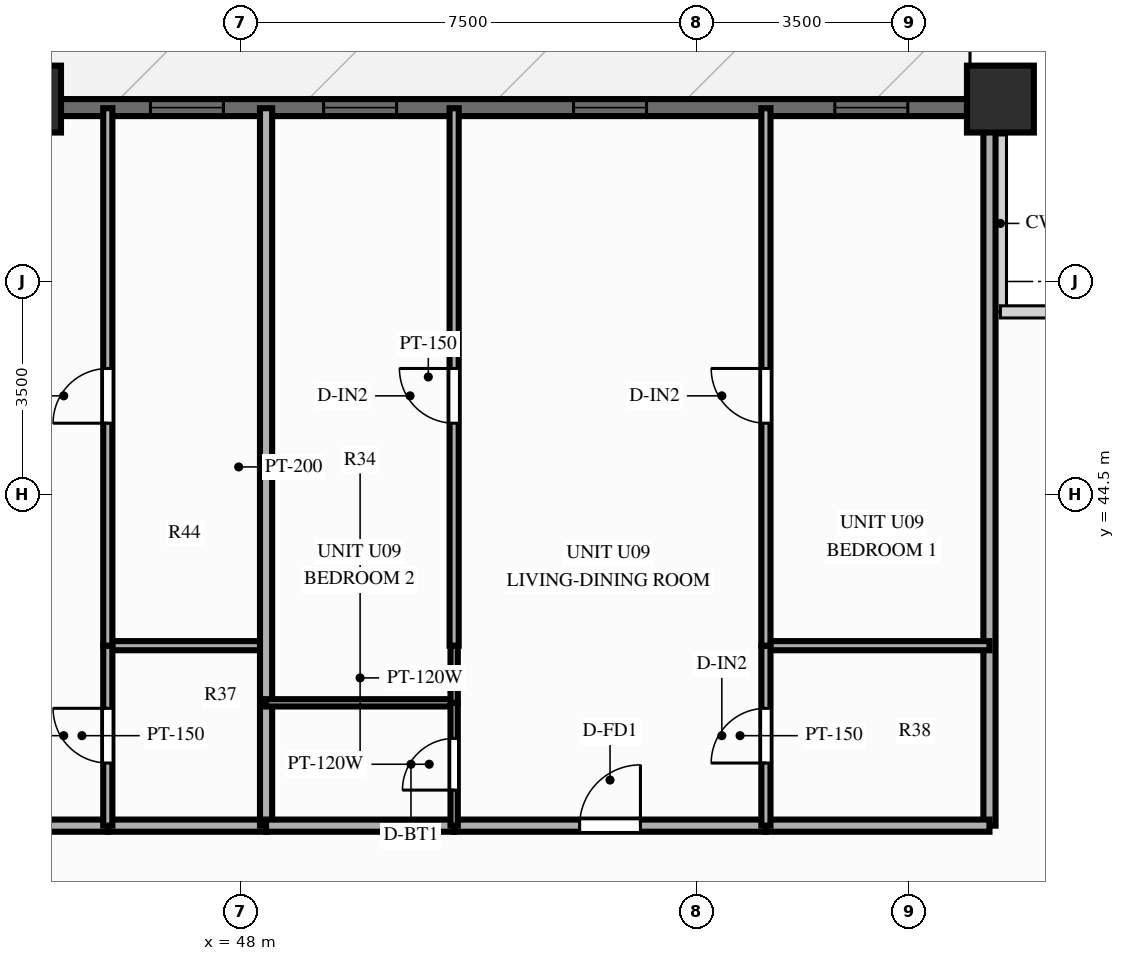
"""IFC4 building model, lengths in metres.
Left out: names, types, materials, properties, quantities, classifications, styles, units other than length and angle.
Written with IfcOpenShell. Run it as: python <this file> out.ifc"""

import sys

from ifc_helpers import new_model, si_unit, direction, frame, frame_2d, origin, origin_2d, place, context, subcontext, project, spatial, rectangle, extrude, source, transform, mapped, element, fill, save


model = new_model("IFC4")
c1 = context("Model", 3, precision=1e-05, world=origin(), true_north=direction((0.0, 1.0)))
c2 = subcontext(c1, "Body", "Model", "MODEL_VIEW")
j1 = project(units=[si_unit("LENGTHUNIT", "METRE"), si_unit("PLANEANGLEUNIT", "RADIAN")], contexts=[c1])
p1 = place(None, origin())
s1 = spatial("IfcSite", under=j1, at=p1, CompositionType="ELEMENT")
p2 = place(p1, origin())
s2 = spatial("IfcBuilding", under=s1, at=p2, CompositionType="ELEMENT")
p3 = place(p2, frame((0.0, 0.0, 61.4)))
s3 = spatial("IfcBuildingStorey", under=s2, at=p3, CompositionType="ELEMENT", Elevation=61.4)
m1 = source(origin(), c2, "Body", "SweptSolid", [
    extrude(rectangle(XDim=1.1, YDim=1.1, at=origin_2d()), origin(), (0.0, 0.0, 1.0), 3.0),
])
for number, where, z_axis, x_axis in (
    (1, (60.5, 51.0, 0.0), (0.0, 0.0, 1.0), (1.0, 0.0, 0.0)),
    (2, (44.5, 51.0, 0.0), (0.0, 0.0, 1.0), (1.0, 0.0, 0.0)),
):
    element("IfcColumn", number, at=place(p3, frame(where, z_axis=z_axis, x_axis=x_axis)), inside=s3, PredefinedType="COLUMN", context=c2, shape_type="MappedRepresentation", body=[
        mapped(m1, transform((0.0, 0.0, 0.0), scale=1.0)),
    ])
p4 = place(p3, frame((15.5, 50.86, 0.0), z_axis=(0.0, 0.0, 1.0), x_axis=(1.0, 0.0, 0.0)))
e3 = element("IfcWall", 3, at=p4, inside=s3, PredefinedType="SOLIDWALL", context=c2, shape_type="SweptSolid", body=[
    extrude(rectangle(XDim=45.0, YDim=0.28, at=frame_2d((22.5, 0.0))), origin(), (0.0, 0.0, 1.0), 2.28),
])
p5 = place(p4, frame((0.76, 0.0, 0.25)))
e4 = element("IfcOpeningElement", 4, at=p5, cuts=e3, PredefinedType="OPENING", context=c2, shape_type="SweptSolid", body=[
    extrude(rectangle(XDim=1.2, YDim=1.5, at=frame_2d((0.6, 0.75))), frame((0.0, 0.152, 0.0), z_axis=(0.0, -1.0, 0.0), x_axis=(1.0, 0.0, 0.0)), (0.0, 0.0, 1.0), 0.304),
])
p6 = place(p4, frame((2.92, 0.0, 0.25)))
e5 = element("IfcOpeningElement", 5, at=p6, cuts=e3, PredefinedType="OPENING", context=c2, shape_type="SweptSolid", body=[
    extrude(rectangle(XDim=1.2, YDim=1.5, at=frame_2d((0.6, 0.75))), frame((0.0, 0.152, 0.0), z_axis=(0.0, -1.0, 0.0), x_axis=(1.0, 0.0, 0.0)), (0.0, 0.0, 1.0), 0.304),
])
p7 = place(p4, frame((5.554, 0.0, 0.25)))
e6 = element("IfcOpeningElement", 6, at=p7, cuts=e3, PredefinedType="OPENING", context=c2, shape_type="SweptSolid", body=[
    extrude(rectangle(XDim=1.2, YDim=1.5, at=frame_2d((0.6, 0.75))), frame((0.0, 0.152, 0.0), z_axis=(0.0, -1.0, 0.0), x_axis=(1.0, 0.0, 0.0)), (0.0, 0.0, 1.0), 0.304),
])
p8 = place(p4, frame((8.613, 0.0, 0.25)))
e7 = element("IfcOpeningElement", 7, at=p8, cuts=e3, PredefinedType="OPENING", context=c2, shape_type="SweptSolid", body=[
    extrude(rectangle(XDim=1.2, YDim=1.5, at=frame_2d((0.6, 0.75))), frame((0.0, 0.152, 0.0), z_axis=(0.0, -1.0, 0.0), x_axis=(1.0, 0.0, 0.0)), (0.0, 0.0, 1.0), 0.304),
])
p9 = place(p4, frame((11.418, 0.0, 0.25)))
e8 = element("IfcOpeningElement", 8, at=p9, cuts=e3, PredefinedType="OPENING", context=c2, shape_type="SweptSolid", body=[
    extrude(rectangle(XDim=1.2, YDim=1.5, at=frame_2d((0.6, 0.75))), frame((0.0, 0.152, 0.0), z_axis=(0.0, -1.0, 0.0), x_axis=(1.0, 0.0, 0.0)), (0.0, 0.0, 1.0), 0.304),
])
p10 = place(p4, frame((13.809, 0.0, 0.25)))
e9 = element("IfcOpeningElement", 9, at=p10, cuts=e3, PredefinedType="OPENING", context=c2, shape_type="SweptSolid", body=[
    extrude(rectangle(XDim=1.2, YDim=1.5, at=frame_2d((0.6, 0.75))), frame((0.0, 0.152, 0.0), z_axis=(0.0, -1.0, 0.0), x_axis=(1.0, 0.0, 0.0)), (0.0, 0.0, 1.0), 0.304),
])
p11 = place(p4, frame((17.258, 0.0, 0.25)))
e10 = element("IfcOpeningElement", 10, at=p11, cuts=e3, PredefinedType="OPENING", context=c2, shape_type="SweptSolid", body=[
    extrude(rectangle(XDim=1.2, YDim=1.5, at=frame_2d((0.6, 0.75))), frame((0.0, 0.152, 0.0), z_axis=(0.0, -1.0, 0.0), x_axis=(1.0, 0.0, 0.0)), (0.0, 0.0, 1.0), 0.304),
])
p12 = place(p4, frame((20.101, 0.0, 0.25)))
e11 = element("IfcOpeningElement", 11, at=p12, cuts=e3, PredefinedType="OPENING", context=c2, shape_type="SweptSolid", body=[
    extrude(rectangle(XDim=1.2, YDim=1.5, at=frame_2d((0.6, 0.75))), frame((0.0, 0.152, 0.0), z_axis=(0.0, -1.0, 0.0), x_axis=(1.0, 0.0, 0.0)), (0.0, 0.0, 1.0), 0.304),
])
p13 = place(p4, frame((24.793, 0.0, 0.0)))
e12 = element("IfcOpeningElement", 12, at=p13, cuts=e3, PredefinedType="OPENING", context=c2, shape_type="SweptSolid", body=[
    extrude(rectangle(XDim=1.1, YDim=2.15, at=frame_2d((0.55, 1.075))), frame((0.0, 0.152, 0.0), z_axis=(0.0, -1.0, 0.0), x_axis=(1.0, 0.0, 0.0)), (0.0, 0.0, 1.0), 0.304),
])
p14 = place(p4, frame((31.021, 0.0, 0.25)))
e13 = element("IfcOpeningElement", 13, at=p14, cuts=e3, PredefinedType="OPENING", context=c2, shape_type="SweptSolid", body=[
    extrude(rectangle(XDim=1.2, YDim=1.5, at=frame_2d((0.6, 0.75))), frame((0.0, 0.152, 0.0), z_axis=(0.0, -1.0, 0.0), x_axis=(1.0, 0.0, 0.0)), (0.0, 0.0, 1.0), 0.304),
])
p15 = place(p4, frame((33.869, 0.0, 0.25)))
e14 = element("IfcOpeningElement", 14, at=p15, cuts=e3, PredefinedType="OPENING", context=c2, shape_type="SweptSolid", body=[
    extrude(rectangle(XDim=1.2, YDim=1.5, at=frame_2d((0.6, 0.75))), frame((0.0, 0.152, 0.0), z_axis=(0.0, -1.0, 0.0), x_axis=(1.0, 0.0, 0.0)), (0.0, 0.0, 1.0), 0.304),
])
p16 = place(p4, frame((37.98, 0.0, 0.25)))
e15 = element("IfcOpeningElement", 15, at=p16, cuts=e3, PredefinedType="OPENING", context=c2, shape_type="SweptSolid", body=[
    extrude(rectangle(XDim=1.2, YDim=1.5, at=frame_2d((0.6, 0.75))), frame((0.0, 0.152, 0.0), z_axis=(0.0, -1.0, 0.0), x_axis=(1.0, 0.0, 0.0)), (0.0, 0.0, 1.0), 0.304),
])
p17 = place(p4, frame((42.277, 0.0, 0.25)))
e16 = element("IfcOpeningElement", 16, at=p17, cuts=e3, PredefinedType="OPENING", context=c2, shape_type="SweptSolid", body=[
    extrude(rectangle(XDim=1.2, YDim=1.5, at=frame_2d((0.6, 0.75))), frame((0.0, 0.152, 0.0), z_axis=(0.0, -1.0, 0.0), x_axis=(1.0, 0.0, 0.0)), (0.0, 0.0, 1.0), 0.304),
])
p18 = place(p3, frame((60.32, 39.05, 0.0), z_axis=(0.0, 0.0, 1.0), x_axis=(0.0, 1.0, 0.0)))
e17 = element("IfcWall", 17, at=p18, inside=s3, PredefinedType="PARTITIONING", context=c2, shape_type="SweptSolid", body=[
    extrude(rectangle(XDim=11.8, YDim=0.2, at=frame_2d((5.9, 0.0))), origin(), (0.0, 0.0, 1.0), 2.79),
])
p19 = place(p3, frame((37.576, 39.05, 0.0), z_axis=(0.0, 0.0, 1.0), x_axis=(1.0, 0.0, 0.0)))
e18 = element("IfcWall", 18, at=p19, inside=s3, PredefinedType="PARTITIONING", context=c2, shape_type="SweptSolid", body=[
    extrude(rectangle(XDim=8.244, YDim=0.2, at=frame_2d((4.122, 0.0))), origin(), (0.0, 0.0, 1.0), 2.79),
])
p20 = place(p19, frame((3.622, 0.0, 0.0)))
e19 = element("IfcOpeningElement", 19, at=p20, cuts=e18, PredefinedType="OPENING", context=c2, shape_type="SweptSolid", body=[
    extrude(rectangle(XDim=1.0, YDim=2.15, at=frame_2d((0.5, 1.075))), frame((0.0, 0.112, 0.0), z_axis=(0.0, -1.0, 0.0), x_axis=(1.0, 0.0, 0.0)), (0.0, 0.0, 1.0), 0.224),
])
p21 = place(p3, frame((45.82, 39.05, 0.0), z_axis=(0.0, 0.0, 1.0), x_axis=(1.0, 0.0, 0.0)))
e20 = element("IfcWall", 20, at=p21, inside=s3, PredefinedType="PARTITIONING", context=c2, shape_type="SweptSolid", body=[
    extrude(rectangle(XDim=2.603, YDim=0.2, at=frame_2d((1.301, 0.0))), origin(), (0.0, 0.0, 1.0), 2.79),
])
p22 = place(p3, frame((45.82, 42.01, 0.0), z_axis=(0.0, 0.0, 1.0), x_axis=(1.0, 0.0, 0.0)))
e21 = element("IfcWall", 21, at=p22, inside=s3, PredefinedType="PARTITIONING", context=c2, shape_type="SweptSolid", body=[
    extrude(rectangle(XDim=2.603, YDim=0.15, at=frame_2d((1.301, 0.0))), origin(), (0.0, 0.0, 1.0), 2.79),
])
p23 = place(p3, frame((45.82, 39.05, 0.0), z_axis=(0.0, 0.0, 1.0), x_axis=(0.0, 1.0, 0.0)))
e22 = element("IfcWall", 22, at=p23, inside=s3, PredefinedType="PARTITIONING", context=c2, shape_type="SweptSolid", body=[
    extrude(rectangle(XDim=2.96, YDim=0.15, at=frame_2d((1.48, 0.0))), origin(), (0.0, 0.0, 1.0), 2.79),
])
p24 = place(p23, frame((1.03, 0.0, 0.0)))
e23 = element("IfcOpeningElement", 23, at=p24, cuts=e22, PredefinedType="OPENING", context=c2, shape_type="SweptSolid", body=[
    extrude(rectangle(XDim=0.9, YDim=2.1, at=frame_2d((0.45, 1.05))), frame((0.0, 0.087, 0.0), z_axis=(0.0, -1.0, 0.0), x_axis=(1.0, 0.0, 0.0)), (0.0, 0.0, 1.0), 0.174),
])
p25 = place(p3, frame((45.82, 42.01, 0.0), z_axis=(0.0, 0.0, 1.0), x_axis=(0.0, 1.0, 0.0)))
e24 = element("IfcWall", 24, at=p25, inside=s3, PredefinedType="PARTITIONING", context=c2, shape_type="SweptSolid", body=[
    extrude(rectangle(XDim=8.84, YDim=0.15, at=frame_2d((4.42, 0.0))), origin(), (0.0, 0.0, 1.0), 2.79),
])
p26 = place(p25, frame((3.659, 0.0, 0.0)))
e25 = element("IfcOpeningElement", 25, at=p26, cuts=e24, PredefinedType="OPENING", context=c2, shape_type="SweptSolid", body=[
    extrude(rectangle(XDim=0.9, YDim=2.1, at=frame_2d((0.45, 1.05))), frame((0.0, 0.087, 0.0), z_axis=(0.0, -1.0, 0.0), x_axis=(1.0, 0.0, 0.0)), (0.0, 0.0, 1.0), 0.174),
])
p27 = place(p3, frame((48.423, 39.05, 0.0), z_axis=(0.0, 0.0, 1.0), x_axis=(0.0, 1.0, 0.0)))
e26 = element("IfcWall", 26, at=p27, inside=s3, PredefinedType="PARTITIONING", context=c2, shape_type="SweptSolid", body=[
    extrude(rectangle(XDim=11.8, YDim=0.2, at=frame_2d((5.9, 0.0))), origin(), (0.0, 0.0, 1.0), 2.79),
])
p28 = place(p3, frame((48.423, 39.05, 0.0), z_axis=(0.0, 0.0, 1.0), x_axis=(1.0, 0.0, 0.0)))
e27 = element("IfcWall", 27, at=p28, inside=s3, PredefinedType="PARTITIONING", context=c2, shape_type="SweptSolid", body=[
    extrude(rectangle(XDim=3.093, YDim=0.2, at=frame_2d((1.547, 0.0))), origin(), (0.0, 0.0, 1.0), 2.79),
])
p29 = place(p3, frame((51.516, 39.05, 0.0), z_axis=(0.0, 0.0, 1.0), x_axis=(1.0, 0.0, 0.0)))
e28 = element("IfcWall", 28, at=p29, inside=s3, PredefinedType="PARTITIONING", context=c2, shape_type="SweptSolid", body=[
    extrude(rectangle(XDim=5.127, YDim=0.2, at=frame_2d((2.564, 0.0))), origin(), (0.0, 0.0, 1.0), 2.79),
])
p30 = place(p29, frame((2.064, 0.0, 0.0)))
e29 = element("IfcOpeningElement", 29, at=p30, cuts=e28, PredefinedType="OPENING", context=c2, shape_type="SweptSolid", body=[
    extrude(rectangle(XDim=1.0, YDim=2.15, at=frame_2d((0.5, 1.075))), frame((0.0, 0.112, 0.0), z_axis=(0.0, -1.0, 0.0), x_axis=(1.0, 0.0, 0.0)), (0.0, 0.0, 1.0), 0.224),
])
p31 = place(p3, frame((56.644, 39.05, 0.0), z_axis=(0.0, 0.0, 1.0), x_axis=(1.0, 0.0, 0.0)))
e30 = element("IfcWall", 30, at=p31, inside=s3, PredefinedType="PARTITIONING", context=c2, shape_type="SweptSolid", body=[
    extrude(rectangle(XDim=3.677, YDim=0.2, at=frame_2d((1.838, 0.0))), origin(), (0.0, 0.0, 1.0), 2.79),
])
p32 = place(p3, frame((48.423, 41.07, 0.0), z_axis=(0.0, 0.0, 1.0), x_axis=(1.0, 0.0, 0.0)))
e31 = element("IfcWall", 31, at=p32, inside=s3, PredefinedType="PARTITIONING", context=c2, shape_type="SweptSolid", body=[
    extrude(rectangle(XDim=3.093, YDim=0.12, at=frame_2d((1.547, 0.0))), origin(), (0.0, 0.0, 1.0), 2.79),
])
p33 = place(p3, frame((56.644, 42.01, 0.0), z_axis=(0.0, 0.0, 1.0), x_axis=(1.0, 0.0, 0.0)))
e32 = element("IfcWall", 32, at=p33, inside=s3, PredefinedType="PARTITIONING", context=c2, shape_type="SweptSolid", body=[
    extrude(rectangle(XDim=3.677, YDim=0.15, at=frame_2d((1.838, 0.0))), origin(), (0.0, 0.0, 1.0), 2.79),
])
p34 = place(p3, frame((51.516, 39.05, 0.0), z_axis=(0.0, 0.0, 1.0), x_axis=(0.0, 1.0, 0.0)))
e33 = element("IfcWall", 33, at=p34, inside=s3, PredefinedType="PARTITIONING", context=c2, shape_type="SweptSolid", body=[
    extrude(rectangle(XDim=2.02, YDim=0.12, at=frame_2d((1.01, 0.0))), origin(), (0.0, 0.0, 1.0), 2.79),
])
p35 = place(p34, frame((0.585, 0.0, 0.0)))
e34 = element("IfcOpeningElement", 34, at=p35, cuts=e33, PredefinedType="OPENING", context=c2, shape_type="SweptSolid", body=[
    extrude(rectangle(XDim=0.85, YDim=2.05, at=frame_2d((0.425, 1.025))), frame((0.0, 0.072, 0.0), z_axis=(0.0, -1.0, 0.0), x_axis=(1.0, 0.0, 0.0)), (0.0, 0.0, 1.0), 0.144),
])
p36 = place(p3, frame((51.516, 41.07, 0.0), z_axis=(0.0, 0.0, 1.0), x_axis=(0.0, 1.0, 0.0)))
e35 = element("IfcWall", 35, at=p36, inside=s3, PredefinedType="PARTITIONING", context=c2, shape_type="SweptSolid", body=[
    extrude(rectangle(XDim=0.94, YDim=0.12, at=frame_2d((0.47, 0.0))), origin(), (0.0, 0.0, 1.0), 2.79),
])
p37 = place(p3, frame((51.516, 42.01, 0.0), z_axis=(0.0, 0.0, 1.0), x_axis=(0.0, 1.0, 0.0)))
e36 = element("IfcWall", 36, at=p37, inside=s3, PredefinedType="PARTITIONING", context=c2, shape_type="SweptSolid", body=[
    extrude(rectangle(XDim=8.84, YDim=0.15, at=frame_2d((4.42, 0.0))), origin(), (0.0, 0.0, 1.0), 2.79),
])
p38 = place(p37, frame((3.659, 0.0, 0.0)))
e37 = element("IfcOpeningElement", 37, at=p38, cuts=e36, PredefinedType="OPENING", context=c2, shape_type="SweptSolid", body=[
    extrude(rectangle(XDim=0.9, YDim=2.1, at=frame_2d((0.45, 1.05))), frame((0.0, 0.087, 0.0), z_axis=(0.0, -1.0, 0.0), x_axis=(1.0, 0.0, 0.0)), (0.0, 0.0, 1.0), 0.174),
])
p39 = place(p3, frame((56.644, 39.05, 0.0), z_axis=(0.0, 0.0, 1.0), x_axis=(0.0, 1.0, 0.0)))
e38 = element("IfcWall", 38, at=p39, inside=s3, PredefinedType="PARTITIONING", context=c2, shape_type="SweptSolid", body=[
    extrude(rectangle(XDim=2.96, YDim=0.15, at=frame_2d((1.48, 0.0))), origin(), (0.0, 0.0, 1.0), 2.79),
])
p40 = place(p39, frame((1.03, 0.0, 0.0)))
e39 = element("IfcOpeningElement", 39, at=p40, cuts=e38, PredefinedType="OPENING", context=c2, shape_type="SweptSolid", body=[
    extrude(rectangle(XDim=0.9, YDim=2.1, at=frame_2d((0.45, 1.05))), frame((0.0, 0.087, 0.0), z_axis=(0.0, -1.0, 0.0), x_axis=(1.0, 0.0, 0.0)), (0.0, 0.0, 1.0), 0.174),
])
p41 = place(p3, frame((56.644, 42.01, 0.0), z_axis=(0.0, 0.0, 1.0), x_axis=(0.0, 1.0, 0.0)))
e40 = element("IfcWall", 40, at=p41, inside=s3, PredefinedType="PARTITIONING", context=c2, shape_type="SweptSolid", body=[
    extrude(rectangle(XDim=8.84, YDim=0.15, at=frame_2d((4.42, 0.0))), origin(), (0.0, 0.0, 1.0), 2.79),
])
p42 = place(p41, frame((3.659, 0.0, 0.0)))
e41 = element("IfcOpeningElement", 41, at=p42, cuts=e40, PredefinedType="OPENING", context=c2, shape_type="SweptSolid", body=[
    extrude(rectangle(XDim=0.9, YDim=2.1, at=frame_2d((0.45, 1.05))), frame((0.0, 0.087, 0.0), z_axis=(0.0, -1.0, 0.0), x_axis=(1.0, 0.0, 0.0)), (0.0, 0.0, 1.0), 0.174),
])
m2 = source(origin(), c2, "Body", "SweptSolid", [
    extrude(rectangle(XDim=1.2, YDim=1.5, at=frame_2d((0.6, 0.75))), frame((0.0, 0.03, 0.0), z_axis=(0.0, -1.0, 0.0), x_axis=(1.0, 0.0, 0.0)), (0.0, 0.0, 1.0), 0.06),
])
p43 = place(p14, origin())
e42 = element("IfcWindow", 42, at=p43, inside=s3, PartitioningType="SINGLE_PANEL", PredefinedType="WINDOW", context=c2, shape_type="MappedRepresentation", body=[
    mapped(m2, transform((0.0, 0.0, 0.0), scale=1.0)),
])
fill(e13, e42)
p44 = place(p15, origin())
e43 = element("IfcWindow", 43, at=p44, inside=s3, PartitioningType="SINGLE_PANEL", PredefinedType="WINDOW", context=c2, shape_type="MappedRepresentation", body=[
    mapped(m2, transform((0.0, 0.0, 0.0), scale=1.0)),
])
fill(e14, e43)
p45 = place(p16, origin())
e44 = element("IfcWindow", 44, at=p45, inside=s3, PartitioningType="SINGLE_PANEL", PredefinedType="WINDOW", context=c2, shape_type="MappedRepresentation", body=[
    mapped(m2, transform((0.0, 0.0, 0.0), scale=1.0)),
])
fill(e15, e44)
p46 = place(p17, origin())
e45 = element("IfcWindow", 45, at=p46, inside=s3, PartitioningType="SINGLE_PANEL", PredefinedType="WINDOW", context=c2, shape_type="MappedRepresentation", body=[
    mapped(m2, transform((0.0, 0.0, 0.0), scale=1.0)),
])
fill(e16, e45)
m3 = source(origin(), c2, "Body", "SweptSolid", [
    extrude(rectangle(XDim=0.9, YDim=2.1, at=frame_2d((0.45, 1.05))), frame((0.0, 0.025, 0.0), z_axis=(0.0, -1.0, 0.0), x_axis=(1.0, 0.0, 0.0)), (0.0, 0.0, 1.0), 0.05),
])
p47 = place(p24, origin())
e46 = element("IfcDoor", 46, at=p47, inside=s3, OperationType="SINGLE_SWING_RIGHT", PredefinedType="DOOR", context=c2, shape_type="MappedRepresentation", body=[
    mapped(m3, transform((0.0, 0.0, 0.0), scale=1.0)),
])
fill(e23, e46)
p48 = place(p26, origin())
e47 = element("IfcDoor", 47, at=p48, inside=s3, OperationType="SINGLE_SWING_LEFT", PredefinedType="DOOR", context=c2, shape_type="MappedRepresentation", body=[
    mapped(m3, transform((0.0, 0.0, 0.0), scale=1.0)),
])
fill(e25, e47)
m4 = source(origin(), c2, "Body", "SweptSolid", [
    extrude(rectangle(XDim=1.0, YDim=2.15, at=frame_2d((0.5, 1.075))), frame((0.0, 0.025, 0.0), z_axis=(0.0, -1.0, 0.0), x_axis=(1.0, 0.0, 0.0)), (0.0, 0.0, 1.0), 0.05),
])
p49 = place(p30, origin())
e48 = element("IfcDoor", 48, at=p49, inside=s3, OperationType="SINGLE_SWING_RIGHT", PredefinedType="DOOR", context=c2, shape_type="MappedRepresentation", body=[
    mapped(m4, transform((0.0, 0.0, 0.0), scale=1.0)),
])
fill(e29, e48)
m5 = source(origin(), c2, "Body", "SweptSolid", [
    extrude(rectangle(XDim=0.85, YDim=2.05, at=frame_2d((0.425, 1.025))), frame((0.0, 0.025, 0.0), z_axis=(0.0, -1.0, 0.0), x_axis=(1.0, 0.0, 0.0)), (0.0, 0.0, 1.0), 0.05),
])
p50 = place(p35, origin())
e49 = element("IfcDoor", 49, at=p50, inside=s3, OperationType="SINGLE_SWING_LEFT", PredefinedType="DOOR", context=c2, shape_type="MappedRepresentation", body=[
    mapped(m5, transform((0.0, 0.0, 0.0), scale=1.0)),
])
fill(e34, e49)
p51 = place(p38, origin())
e50 = element("IfcDoor", 50, at=p51, inside=s3, OperationType="SINGLE_SWING_RIGHT", PredefinedType="DOOR", context=c2, shape_type="MappedRepresentation", body=[
    mapped(m3, transform((0.0, 0.0, 0.0), scale=1.0)),
])
fill(e37, e50)
p52 = place(p40, origin())
e51 = element("IfcDoor", 51, at=p52, inside=s3, OperationType="SINGLE_SWING_LEFT", PredefinedType="DOOR", context=c2, shape_type="MappedRepresentation", body=[
    mapped(m3, transform((0.0, 0.0, 0.0), scale=1.0)),
])
fill(e39, e51)
p53 = place(p42, origin())
e52 = element("IfcDoor", 52, at=p53, inside=s3, OperationType="SINGLE_SWING_RIGHT", PredefinedType="DOOR", context=c2, shape_type="MappedRepresentation", body=[
    mapped(m3, transform((0.0, 0.0, 0.0), scale=1.0)),
])
fill(e41, e52)
save(model, sys.argv[1])
